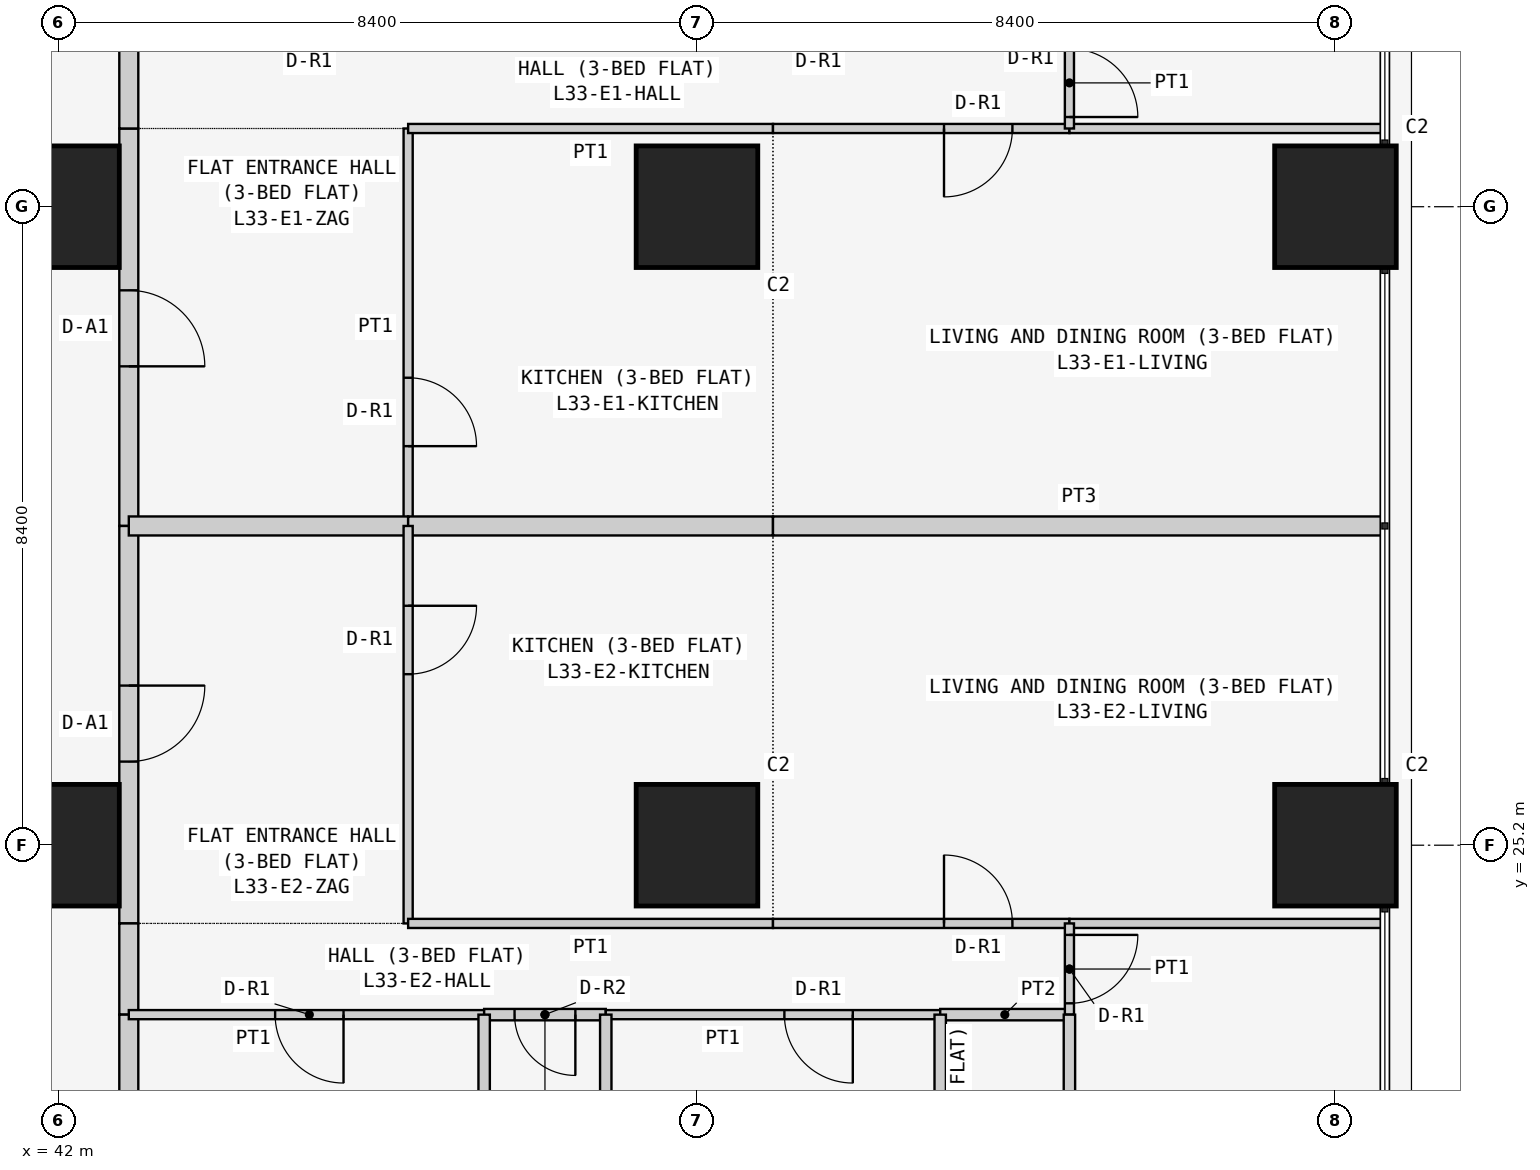
"""IFC4 building model, lengths in metres.
Left out: names, types, materials, properties, quantities, classifications, styles, units other than length and angle.
Written with IfcOpenShell. Run it as: python <this file> out.ifc"""

import sys

from ifc_helpers import new_model, si_unit, direction, frame, frame_2d, origin, origin_2d, place, context, subcontext, project, spatial, rectangle, extrude, element, fill, save


model = new_model("IFC4")
c1 = context("Model", 3, precision=1e-05, world=origin(), true_north=direction((0.0, 1.0)))
c2 = subcontext(c1, "Body", "Model", "MODEL_VIEW")
j1 = project(units=[si_unit("LENGTHUNIT", "METRE"), si_unit("PLANEANGLEUNIT", "RADIAN")], contexts=[c1])
p1 = place(None, origin())
s1 = spatial("IfcSite", under=j1, at=p1, CompositionType="ELEMENT")
p2 = place(p1, origin())
s2 = spatial("IfcBuilding", under=s1, at=p2, CompositionType="ELEMENT")
p3 = place(p2, frame((0.0, 0.0, 130.5)))
s3 = spatial("IfcBuildingStorey", under=s2, at=p3, CompositionType="ELEMENT", Elevation=130.5)
for number, where, z_axis, x_axis in (
    (1, (42.0, 25.2, 0.0), (0.0, 0.0, 1.0), (1.0, 0.0, 0.0)),
    (2, (42.0, 33.6, 0.0), (0.0, 0.0, 1.0), (1.0, 0.0, 0.0)),
    (3, (50.4, 25.2, 0.0), (0.0, 0.0, 1.0), (1.0, 0.0, 0.0)),
    (4, (50.4, 33.6, 0.0), (0.0, 0.0, 1.0), (1.0, 0.0, 0.0)),
    (5, (58.8, 25.2, 0.0), (0.0, 0.0, 1.0), (1.0, 0.0, 0.0)),
    (6, (58.8, 33.6, 0.0), (0.0, 0.0, 1.0), (1.0, 0.0, 0.0)),
):
    element("IfcColumn", number, at=place(p3, frame(where, z_axis=z_axis, x_axis=x_axis)), inside=s3, PredefinedType="COLUMN", context=c2, shape_type="SweptSolid", body=[
        extrude(rectangle(XDim=1.6, YDim=1.6, at=origin_2d()), origin(), (0.0, 0.0, 1.0), 3.6),
    ])
p4 = place(p3, frame((42.925, 34.629, 0.0), z_axis=(0.0, 0.0, 1.0), x_axis=(0.0, -1.0, 0.0)))
e7 = element("IfcWall", 7, at=p4, inside=s3, PredefinedType="PARTITIONING", context=c2, shape_type="SweptSolid", body=[
    extrude(rectangle(XDim=5.229, YDim=0.25, at=frame_2d((2.615, 0.0))), origin(), (0.0, 0.0, 1.0), 3.45),
])
p5 = place(p4, frame((2.129, 0.0, 0.0)))
e8 = element("IfcOpeningElement", 8, at=p5, cuts=e7, PredefinedType="OPENING", context=c2, shape_type="SweptSolid", body=[
    extrude(rectangle(XDim=1.0, YDim=2.1, at=frame_2d((0.5, 1.05))), frame((0.0, 0.135, 0.0), z_axis=(0.0, -1.0, 0.0), x_axis=(1.0, 0.0, 0.0)), (0.0, 0.0, 1.0), 0.27),
])
p6 = place(p3, frame((42.925, 35.829, 0.0), z_axis=(0.0, 0.0, 1.0), x_axis=(0.0, -1.0, 0.0)))
e9 = element("IfcWall", 9, at=p6, inside=s3, PredefinedType="PARTITIONING", context=c2, shape_type="SweptSolid", body=[
    extrude(rectangle(XDim=1.2, YDim=0.25, at=frame_2d((0.6, 0.0))), origin(), (0.0, 0.0, 1.0), 3.45),
])
p7 = place(p3, frame((42.925, 29.4, 0.0), z_axis=(0.0, 0.0, 1.0), x_axis=(0.0, -1.0, 0.0)))
e10 = element("IfcWall", 10, at=p7, inside=s3, PredefinedType="PARTITIONING", context=c2, shape_type="SweptSolid", body=[
    extrude(rectangle(XDim=5.229, YDim=0.25, at=frame_2d((2.615, 0.0))), origin(), (0.0, 0.0, 1.0), 3.45),
])
p8 = place(p7, frame((2.1, 0.0, 0.0)))
e11 = element("IfcOpeningElement", 11, at=p8, cuts=e10, PredefinedType="OPENING", context=c2, shape_type="SweptSolid", body=[
    extrude(rectangle(XDim=1.0, YDim=2.1, at=frame_2d((0.5, 1.05))), frame((0.0, 0.135, 0.0), z_axis=(0.0, -1.0, 0.0), x_axis=(1.0, 0.0, 0.0)), (0.0, 0.0, 1.0), 0.27),
])
p9 = place(p3, frame((42.925, 24.171, 0.0), z_axis=(0.0, 0.0, 1.0), x_axis=(0.0, -1.0, 0.0)))
e12 = element("IfcWall", 12, at=p9, inside=s3, PredefinedType="PARTITIONING", context=c2, shape_type="SweptSolid", body=[
    extrude(rectangle(XDim=1.2, YDim=0.25, at=frame_2d((0.6, 0.0))), origin(), (0.0, 0.0, 1.0), 3.45),
])
p10 = place(p3, frame((42.925, 22.971, 0.0), z_axis=(0.0, 0.0, 1.0), x_axis=(0.0, -1.0, 0.0)))
e13 = element("IfcWall", 13, at=p10, inside=s3, PredefinedType="PARTITIONING", context=c2, shape_type="SweptSolid", body=[
    extrude(rectangle(XDim=6.871, YDim=0.25, at=frame_2d((3.436, 0.0))), origin(), (0.0, 0.0, 1.0), 3.45),
])
p11 = place(p3, frame((46.6, 29.4, 0.0), z_axis=(0.0, 0.0, 1.0), x_axis=(0.0, 1.0, 0.0)))
e14 = element("IfcWall", 14, at=p11, inside=s3, PredefinedType="PARTITIONING", context=c2, shape_type="SweptSolid", body=[
    extrude(rectangle(XDim=5.229, YDim=0.12, at=frame_2d((2.615, 0.0))), origin(), (0.0, 0.0, 1.0), 3.45),
])
p12 = place(p11, frame((1.05, 0.0, 0.0)))
e15 = element("IfcOpeningElement", 15, at=p12, cuts=e14, PredefinedType="OPENING", context=c2, shape_type="SweptSolid", body=[
    extrude(rectangle(XDim=0.9, YDim=2.1, at=frame_2d((0.45, 1.05))), frame((0.0, 0.07, 0.0), z_axis=(0.0, -1.0, 0.0), x_axis=(1.0, 0.0, 0.0)), (0.0, 0.0, 1.0), 0.14),
])
p13 = place(p3, frame((42.925, 29.4, 0.0), z_axis=(0.0, 0.0, 1.0), x_axis=(1.0, 0.0, 0.0)))
e16 = element("IfcWall", 16, at=p13, inside=s3, PredefinedType="PARTITIONING", context=c2, shape_type="SweptSolid", body=[
    extrude(rectangle(XDim=3.675, YDim=0.25, at=frame_2d((1.837, 0.0))), origin(), (0.0, 0.0, 1.0), 3.45),
])
p14 = place(p3, frame((51.4, 34.629, 0.0), z_axis=(0.0, 0.0, 1.0), x_axis=(-1.0, 0.0, 0.0)))
e17 = element("IfcWall", 17, at=p14, inside=s3, PredefinedType="PARTITIONING", context=c2, shape_type="SweptSolid", body=[
    extrude(rectangle(XDim=4.8, YDim=0.12, at=frame_2d((2.4, 0.0))), origin(), (0.0, 0.0, 1.0), 3.45),
])
p15 = place(p3, frame((46.6, 29.4, 0.0), z_axis=(0.0, 0.0, 1.0), x_axis=(1.0, 0.0, 0.0)))
e18 = element("IfcWall", 18, at=p15, inside=s3, PredefinedType="PARTITIONING", context=c2, shape_type="SweptSolid", body=[
    extrude(rectangle(XDim=4.8, YDim=0.25, at=frame_2d((2.4, 0.0))), origin(), (0.0, 0.0, 1.0), 3.45),
])
p16 = place(p3, frame((55.3, 34.629, 0.0), z_axis=(0.0, 0.0, 1.0), x_axis=(-1.0, 0.0, 0.0)))
e19 = element("IfcWall", 19, at=p16, inside=s3, PredefinedType="PARTITIONING", context=c2, shape_type="SweptSolid", body=[
    extrude(rectangle(XDim=3.9, YDim=0.12, at=frame_2d((1.95, 0.0))), origin(), (0.0, 0.0, 1.0), 3.45),
])
p17 = place(p16, frame((0.75, 0.0, 0.0)))
e20 = element("IfcOpeningElement", 20, at=p17, cuts=e19, PredefinedType="OPENING", context=c2, shape_type="SweptSolid", body=[
    extrude(rectangle(XDim=0.9, YDim=2.1, at=frame_2d((0.45, 1.05))), frame((0.0, 0.07, 0.0), z_axis=(0.0, -1.0, 0.0), x_axis=(1.0, 0.0, 0.0)), (0.0, 0.0, 1.0), 0.14),
])
p18 = place(p3, frame((59.45, 34.629, 0.0), z_axis=(0.0, 0.0, 1.0), x_axis=(-1.0, 0.0, 0.0)))
e21 = element("IfcWall", 21, at=p18, inside=s3, PredefinedType="PARTITIONING", context=c2, shape_type="SweptSolid", body=[
    extrude(rectangle(XDim=4.15, YDim=0.12, at=frame_2d((2.075, 0.0))), origin(), (0.0, 0.0, 1.0), 3.45),
])
p19 = place(p3, frame((51.4, 29.4, 0.0), z_axis=(0.0, 0.0, 1.0), x_axis=(1.0, 0.0, 0.0)))
e22 = element("IfcWall", 22, at=p19, inside=s3, PredefinedType="PARTITIONING", context=c2, shape_type="SweptSolid", body=[
    extrude(rectangle(XDim=8.05, YDim=0.25, at=frame_2d((4.025, 0.0))), origin(), (0.0, 0.0, 1.0), 3.45),
])
p20 = place(p3, frame((55.3, 34.629, 0.0), z_axis=(0.0, 0.0, 1.0), x_axis=(0.0, 1.0, 0.0)))
e23 = element("IfcWall", 23, at=p20, inside=s3, PredefinedType="PARTITIONING", context=c2, shape_type="SweptSolid", body=[
    extrude(rectangle(XDim=1.2, YDim=0.12, at=frame_2d((0.6, 0.0))), origin(), (0.0, 0.0, 1.0), 3.45),
])
p21 = place(p20, frame((0.151, 0.0, 0.0)))
e24 = element("IfcOpeningElement", 24, at=p21, cuts=e23, PredefinedType="OPENING", context=c2, shape_type="SweptSolid", body=[
    extrude(rectangle(XDim=0.9, YDim=2.1, at=frame_2d((0.45, 1.05))), frame((0.0, 0.07, 0.0), z_axis=(0.0, -1.0, 0.0), x_axis=(1.0, 0.0, 0.0)), (0.0, 0.0, 1.0), 0.14),
])
p22 = place(p3, frame((46.6, 29.4, 0.0), z_axis=(0.0, 0.0, 1.0), x_axis=(0.0, -1.0, 0.0)))
e25 = element("IfcWall", 25, at=p22, inside=s3, PredefinedType="PARTITIONING", context=c2, shape_type="SweptSolid", body=[
    extrude(rectangle(XDim=5.229, YDim=0.12, at=frame_2d((2.615, 0.0))), origin(), (0.0, 0.0, 1.0), 3.45),
])
p23 = place(p22, frame((1.05, 0.0, 0.0)))
e26 = element("IfcOpeningElement", 26, at=p23, cuts=e25, PredefinedType="OPENING", context=c2, shape_type="SweptSolid", body=[
    extrude(rectangle(XDim=0.9, YDim=2.1, at=frame_2d((0.45, 1.05))), frame((0.0, 0.07, 0.0), z_axis=(0.0, -1.0, 0.0), x_axis=(1.0, 0.0, 0.0)), (0.0, 0.0, 1.0), 0.14),
])
p24 = place(p3, frame((51.4, 24.171, 0.0), z_axis=(0.0, 0.0, 1.0), x_axis=(-1.0, 0.0, 0.0)))
e27 = element("IfcWall", 27, at=p24, inside=s3, PredefinedType="PARTITIONING", context=c2, shape_type="SweptSolid", body=[
    extrude(rectangle(XDim=4.8, YDim=0.12, at=frame_2d((2.4, 0.0))), origin(), (0.0, 0.0, 1.0), 3.45),
])
p25 = place(p3, frame((55.3, 24.171, 0.0), z_axis=(0.0, 0.0, 1.0), x_axis=(-1.0, 0.0, 0.0)))
e28 = element("IfcWall", 28, at=p25, inside=s3, PredefinedType="PARTITIONING", context=c2, shape_type="SweptSolid", body=[
    extrude(rectangle(XDim=3.9, YDim=0.12, at=frame_2d((1.95, 0.0))), origin(), (0.0, 0.0, 1.0), 3.45),
])
p26 = place(p25, frame((0.75, 0.0, 0.0)))
e29 = element("IfcOpeningElement", 29, at=p26, cuts=e28, PredefinedType="OPENING", context=c2, shape_type="SweptSolid", body=[
    extrude(rectangle(XDim=0.9, YDim=2.1, at=frame_2d((0.45, 1.05))), frame((0.0, 0.07, 0.0), z_axis=(0.0, -1.0, 0.0), x_axis=(1.0, 0.0, 0.0)), (0.0, 0.0, 1.0), 0.14),
])
p27 = place(p3, frame((59.45, 24.171, 0.0), z_axis=(0.0, 0.0, 1.0), x_axis=(-1.0, 0.0, 0.0)))
e30 = element("IfcWall", 30, at=p27, inside=s3, PredefinedType="PARTITIONING", context=c2, shape_type="SweptSolid", body=[
    extrude(rectangle(XDim=4.15, YDim=0.12, at=frame_2d((2.075, 0.0))), origin(), (0.0, 0.0, 1.0), 3.45),
])
p28 = place(p3, frame((47.6, 22.971, 0.0), z_axis=(0.0, 0.0, 1.0), x_axis=(-1.0, 0.0, 0.0)))
e31 = element("IfcWall", 31, at=p28, inside=s3, PredefinedType="PARTITIONING", context=c2, shape_type="SweptSolid", body=[
    extrude(rectangle(XDim=4.675, YDim=0.12, at=frame_2d((2.337, 0.0))), origin(), (0.0, 0.0, 1.0), 3.45),
])
p29 = place(p28, frame((1.85, 0.0, 0.0)))
e32 = element("IfcOpeningElement", 32, at=p29, cuts=e31, PredefinedType="OPENING", context=c2, shape_type="SweptSolid", body=[
    extrude(rectangle(XDim=0.9, YDim=2.1, at=frame_2d((0.45, 1.05))), frame((0.0, 0.07, 0.0), z_axis=(0.0, -1.0, 0.0), x_axis=(1.0, 0.0, 0.0)), (0.0, 0.0, 1.0), 0.14),
])
p30 = place(p3, frame((49.2, 22.971, 0.0), z_axis=(0.0, 0.0, 1.0), x_axis=(-1.0, 0.0, 0.0)))
e33 = element("IfcWall", 33, at=p30, inside=s3, PredefinedType="PARTITIONING", context=c2, shape_type="SweptSolid", body=[
    extrude(rectangle(XDim=1.6, YDim=0.15, at=frame_2d((0.8, 0.0))), origin(), (0.0, 0.0, 1.0), 3.45),
])
p31 = place(p30, frame((0.4, 0.0, 0.0)))
e34 = element("IfcOpeningElement", 34, at=p31, cuts=e33, PredefinedType="OPENING", context=c2, shape_type="SweptSolid", body=[
    extrude(rectangle(XDim=0.8, YDim=2.1, at=frame_2d((0.4, 1.05))), frame((0.0, 0.085, 0.0), z_axis=(0.0, -1.0, 0.0), x_axis=(1.0, 0.0, 0.0)), (0.0, 0.0, 1.0), 0.17),
])
p32 = place(p3, frame((53.6, 22.971, 0.0), z_axis=(0.0, 0.0, 1.0), x_axis=(-1.0, 0.0, 0.0)))
e35 = element("IfcWall", 35, at=p32, inside=s3, PredefinedType="PARTITIONING", context=c2, shape_type="SweptSolid", body=[
    extrude(rectangle(XDim=4.4, YDim=0.12, at=frame_2d((2.2, 0.0))), origin(), (0.0, 0.0, 1.0), 3.45),
])
p33 = place(p32, frame((1.15, 0.0, 0.0)))
e36 = element("IfcOpeningElement", 36, at=p33, cuts=e35, PredefinedType="OPENING", context=c2, shape_type="SweptSolid", body=[
    extrude(rectangle(XDim=0.9, YDim=2.1, at=frame_2d((0.45, 1.05))), frame((0.0, 0.07, 0.0), z_axis=(0.0, -1.0, 0.0), x_axis=(1.0, 0.0, 0.0)), (0.0, 0.0, 1.0), 0.14),
])
p34 = place(p3, frame((55.3, 22.971, 0.0), z_axis=(0.0, 0.0, 1.0), x_axis=(-1.0, 0.0, 0.0)))
e37 = element("IfcWall", 37, at=p34, inside=s3, PredefinedType="PARTITIONING", context=c2, shape_type="SweptSolid", body=[
    extrude(rectangle(XDim=1.7, YDim=0.15, at=frame_2d((0.85, 0.0))), origin(), (0.0, 0.0, 1.0), 3.45),
])
p35 = place(p3, frame((55.3, 24.171, 0.0), z_axis=(0.0, 0.0, 1.0), x_axis=(0.0, -1.0, 0.0)))
e38 = element("IfcWall", 38, at=p35, inside=s3, PredefinedType="PARTITIONING", context=c2, shape_type="SweptSolid", body=[
    extrude(rectangle(XDim=1.2, YDim=0.12, at=frame_2d((0.6, 0.0))), origin(), (0.0, 0.0, 1.0), 3.45),
])
p36 = place(p35, frame((0.151, 0.0, 0.0)))
e39 = element("IfcOpeningElement", 39, at=p36, cuts=e38, PredefinedType="OPENING", context=c2, shape_type="SweptSolid", body=[
    extrude(rectangle(XDim=0.9, YDim=2.1, at=frame_2d((0.45, 1.05))), frame((0.0, 0.07, 0.0), z_axis=(0.0, -1.0, 0.0), x_axis=(1.0, 0.0, 0.0)), (0.0, 0.0, 1.0), 0.14),
])
for number, where, z_axis, x_axis in (
    (40, (47.6, 22.971, 0.0), (0.0, 0.0, 1.0), (0.0, -1.0, 0.0)),
    (41, (49.2, 22.971, 0.0), (0.0, 0.0, 1.0), (0.0, -1.0, 0.0)),
    (42, (53.6, 22.971, 0.0), (0.0, 0.0, 1.0), (0.0, -1.0, 0.0)),
):
    element("IfcWall", number, at=place(p3, frame(where, z_axis=z_axis, x_axis=x_axis)), inside=s3, PredefinedType="PARTITIONING", context=c2, shape_type="SweptSolid", body=[
        extrude(rectangle(XDim=6.871, YDim=0.15, at=frame_2d((3.436, 0.0))), origin(), (0.0, 0.0, 1.0), 3.45),
    ])
p37 = place(p3, frame((55.3, 22.971, 0.0), z_axis=(0.0, 0.0, 1.0), x_axis=(0.0, -1.0, 0.0)))
e43 = element("IfcWall", 43, at=p37, inside=s3, PredefinedType="PARTITIONING", context=c2, shape_type="SweptSolid", body=[
    extrude(rectangle(XDim=6.871, YDim=0.15, at=frame_2d((3.436, 0.0))), origin(), (0.0, 0.0, 1.0), 3.45),
])
p38 = place(p37, frame((3.171, 0.0, 0.0)))
e44 = element("IfcOpeningElement", 44, at=p38, cuts=e43, PredefinedType="OPENING", context=c2, shape_type="SweptSolid", body=[
    extrude(rectangle(XDim=0.8, YDim=2.1, at=frame_2d((0.4, 1.05))), frame((0.0, 0.085, 0.0), z_axis=(0.0, -1.0, 0.0), x_axis=(1.0, 0.0, 0.0)), (0.0, 0.0, 1.0), 0.17),
])
p39 = place(p5, origin())
e45 = element("IfcDoor", 45, at=p39, inside=s3, OperationType="SINGLE_SWING_RIGHT", PredefinedType="DOOR", context=c2, shape_type="SweptSolid", body=[
    extrude(rectangle(XDim=1.0, YDim=2.1, at=frame_2d((0.5, 1.05))), frame((0.0, 0.025, 0.0), z_axis=(0.0, -1.0, 0.0), x_axis=(1.0, 0.0, 0.0)), (0.0, 0.0, 1.0), 0.05),
])
fill(e8, e45)
p40 = place(p12, frame((0.9, 0.0, 0.0), z_axis=(0.0, 0.0, 1.0), x_axis=(-1.0, 0.0, 0.0)))
e46 = element("IfcDoor", 46, at=p40, inside=s3, OperationType="SINGLE_SWING_RIGHT", PredefinedType="DOOR", context=c2, shape_type="SweptSolid", body=[
    extrude(rectangle(XDim=0.9, YDim=2.1, at=frame_2d((0.45, 1.05))), frame((0.0, 0.025, 0.0), z_axis=(0.0, -1.0, 0.0), x_axis=(1.0, 0.0, 0.0)), (0.0, 0.0, 1.0), 0.05),
])
fill(e15, e46)
p41 = place(p17, origin())
e47 = element("IfcDoor", 47, at=p41, inside=s3, OperationType="SINGLE_SWING_RIGHT", PredefinedType="DOOR", context=c2, shape_type="SweptSolid", body=[
    extrude(rectangle(XDim=0.9, YDim=2.1, at=frame_2d((0.45, 1.05))), frame((0.0, 0.025, 0.0), z_axis=(0.0, -1.0, 0.0), x_axis=(1.0, 0.0, 0.0)), (0.0, 0.0, 1.0), 0.05),
])
fill(e20, e47)
p42 = place(p21, frame((0.9, 0.0, 0.0), z_axis=(0.0, 0.0, 1.0), x_axis=(-1.0, 0.0, 0.0)))
e48 = element("IfcDoor", 48, at=p42, inside=s3, OperationType="SINGLE_SWING_RIGHT", PredefinedType="DOOR", context=c2, shape_type="SweptSolid", body=[
    extrude(rectangle(XDim=0.9, YDim=2.1, at=frame_2d((0.45, 1.05))), frame((0.0, 0.025, 0.0), z_axis=(0.0, -1.0, 0.0), x_axis=(1.0, 0.0, 0.0)), (0.0, 0.0, 1.0), 0.05),
])
fill(e24, e48)
p43 = place(p8, origin())
e49 = element("IfcDoor", 49, at=p43, inside=s3, OperationType="SINGLE_SWING_LEFT", PredefinedType="DOOR", context=c2, shape_type="SweptSolid", body=[
    extrude(rectangle(XDim=1.0, YDim=2.1, at=frame_2d((0.5, 1.05))), frame((0.0, 0.025, 0.0), z_axis=(0.0, -1.0, 0.0), x_axis=(1.0, 0.0, 0.0)), (0.0, 0.0, 1.0), 0.05),
])
fill(e11, e49)
p44 = place(p23, origin())
e50 = element("IfcDoor", 50, at=p44, inside=s3, OperationType="SINGLE_SWING_LEFT", PredefinedType="DOOR", context=c2, shape_type="SweptSolid", body=[
    extrude(rectangle(XDim=0.9, YDim=2.1, at=frame_2d((0.45, 1.05))), frame((0.0, 0.025, 0.0), z_axis=(0.0, -1.0, 0.0), x_axis=(1.0, 0.0, 0.0)), (0.0, 0.0, 1.0), 0.05),
])
fill(e26, e50)
p45 = place(p26, frame((0.9, 0.0, 0.0), z_axis=(0.0, 0.0, 1.0), x_axis=(-1.0, 0.0, 0.0)))
e51 = element("IfcDoor", 51, at=p45, inside=s3, OperationType="SINGLE_SWING_LEFT", PredefinedType="DOOR", context=c2, shape_type="SweptSolid", body=[
    extrude(rectangle(XDim=0.9, YDim=2.1, at=frame_2d((0.45, 1.05))), frame((0.0, 0.025, 0.0), z_axis=(0.0, -1.0, 0.0), x_axis=(1.0, 0.0, 0.0)), (0.0, 0.0, 1.0), 0.05),
])
fill(e29, e51)
p46 = place(p29, origin())
e52 = element("IfcDoor", 52, at=p46, inside=s3, OperationType="SINGLE_SWING_LEFT", PredefinedType="DOOR", context=c2, shape_type="SweptSolid", body=[
    extrude(rectangle(XDim=0.9, YDim=2.1, at=frame_2d((0.45, 1.05))), frame((0.0, 0.025, 0.0), z_axis=(0.0, -1.0, 0.0), x_axis=(1.0, 0.0, 0.0)), (0.0, 0.0, 1.0), 0.05),
])
fill(e32, e52)
p47 = place(p31, origin())
e53 = element("IfcDoor", 53, at=p47, inside=s3, OperationType="SINGLE_SWING_LEFT", PredefinedType="DOOR", context=c2, shape_type="SweptSolid", body=[
    extrude(rectangle(XDim=0.8, YDim=2.1, at=frame_2d((0.4, 1.05))), frame((0.0, 0.025, 0.0), z_axis=(0.0, -1.0, 0.0), x_axis=(1.0, 0.0, 0.0)), (0.0, 0.0, 1.0), 0.05),
])
fill(e34, e53)
p48 = place(p33, origin())
e54 = element("IfcDoor", 54, at=p48, inside=s3, OperationType="SINGLE_SWING_LEFT", PredefinedType="DOOR", context=c2, shape_type="SweptSolid", body=[
    extrude(rectangle(XDim=0.9, YDim=2.1, at=frame_2d((0.45, 1.05))), frame((0.0, 0.025, 0.0), z_axis=(0.0, -1.0, 0.0), x_axis=(1.0, 0.0, 0.0)), (0.0, 0.0, 1.0), 0.05),
])
fill(e36, e54)
p49 = place(p36, origin())
e55 = element("IfcDoor", 55, at=p49, inside=s3, OperationType="SINGLE_SWING_LEFT", PredefinedType="DOOR", context=c2, shape_type="SweptSolid", body=[
    extrude(rectangle(XDim=0.9, YDim=2.1, at=frame_2d((0.45, 1.05))), frame((0.0, 0.025, 0.0), z_axis=(0.0, -1.0, 0.0), x_axis=(1.0, 0.0, 0.0)), (0.0, 0.0, 1.0), 0.05),
])
fill(e39, e55)
save(model, sys.argv[1])
